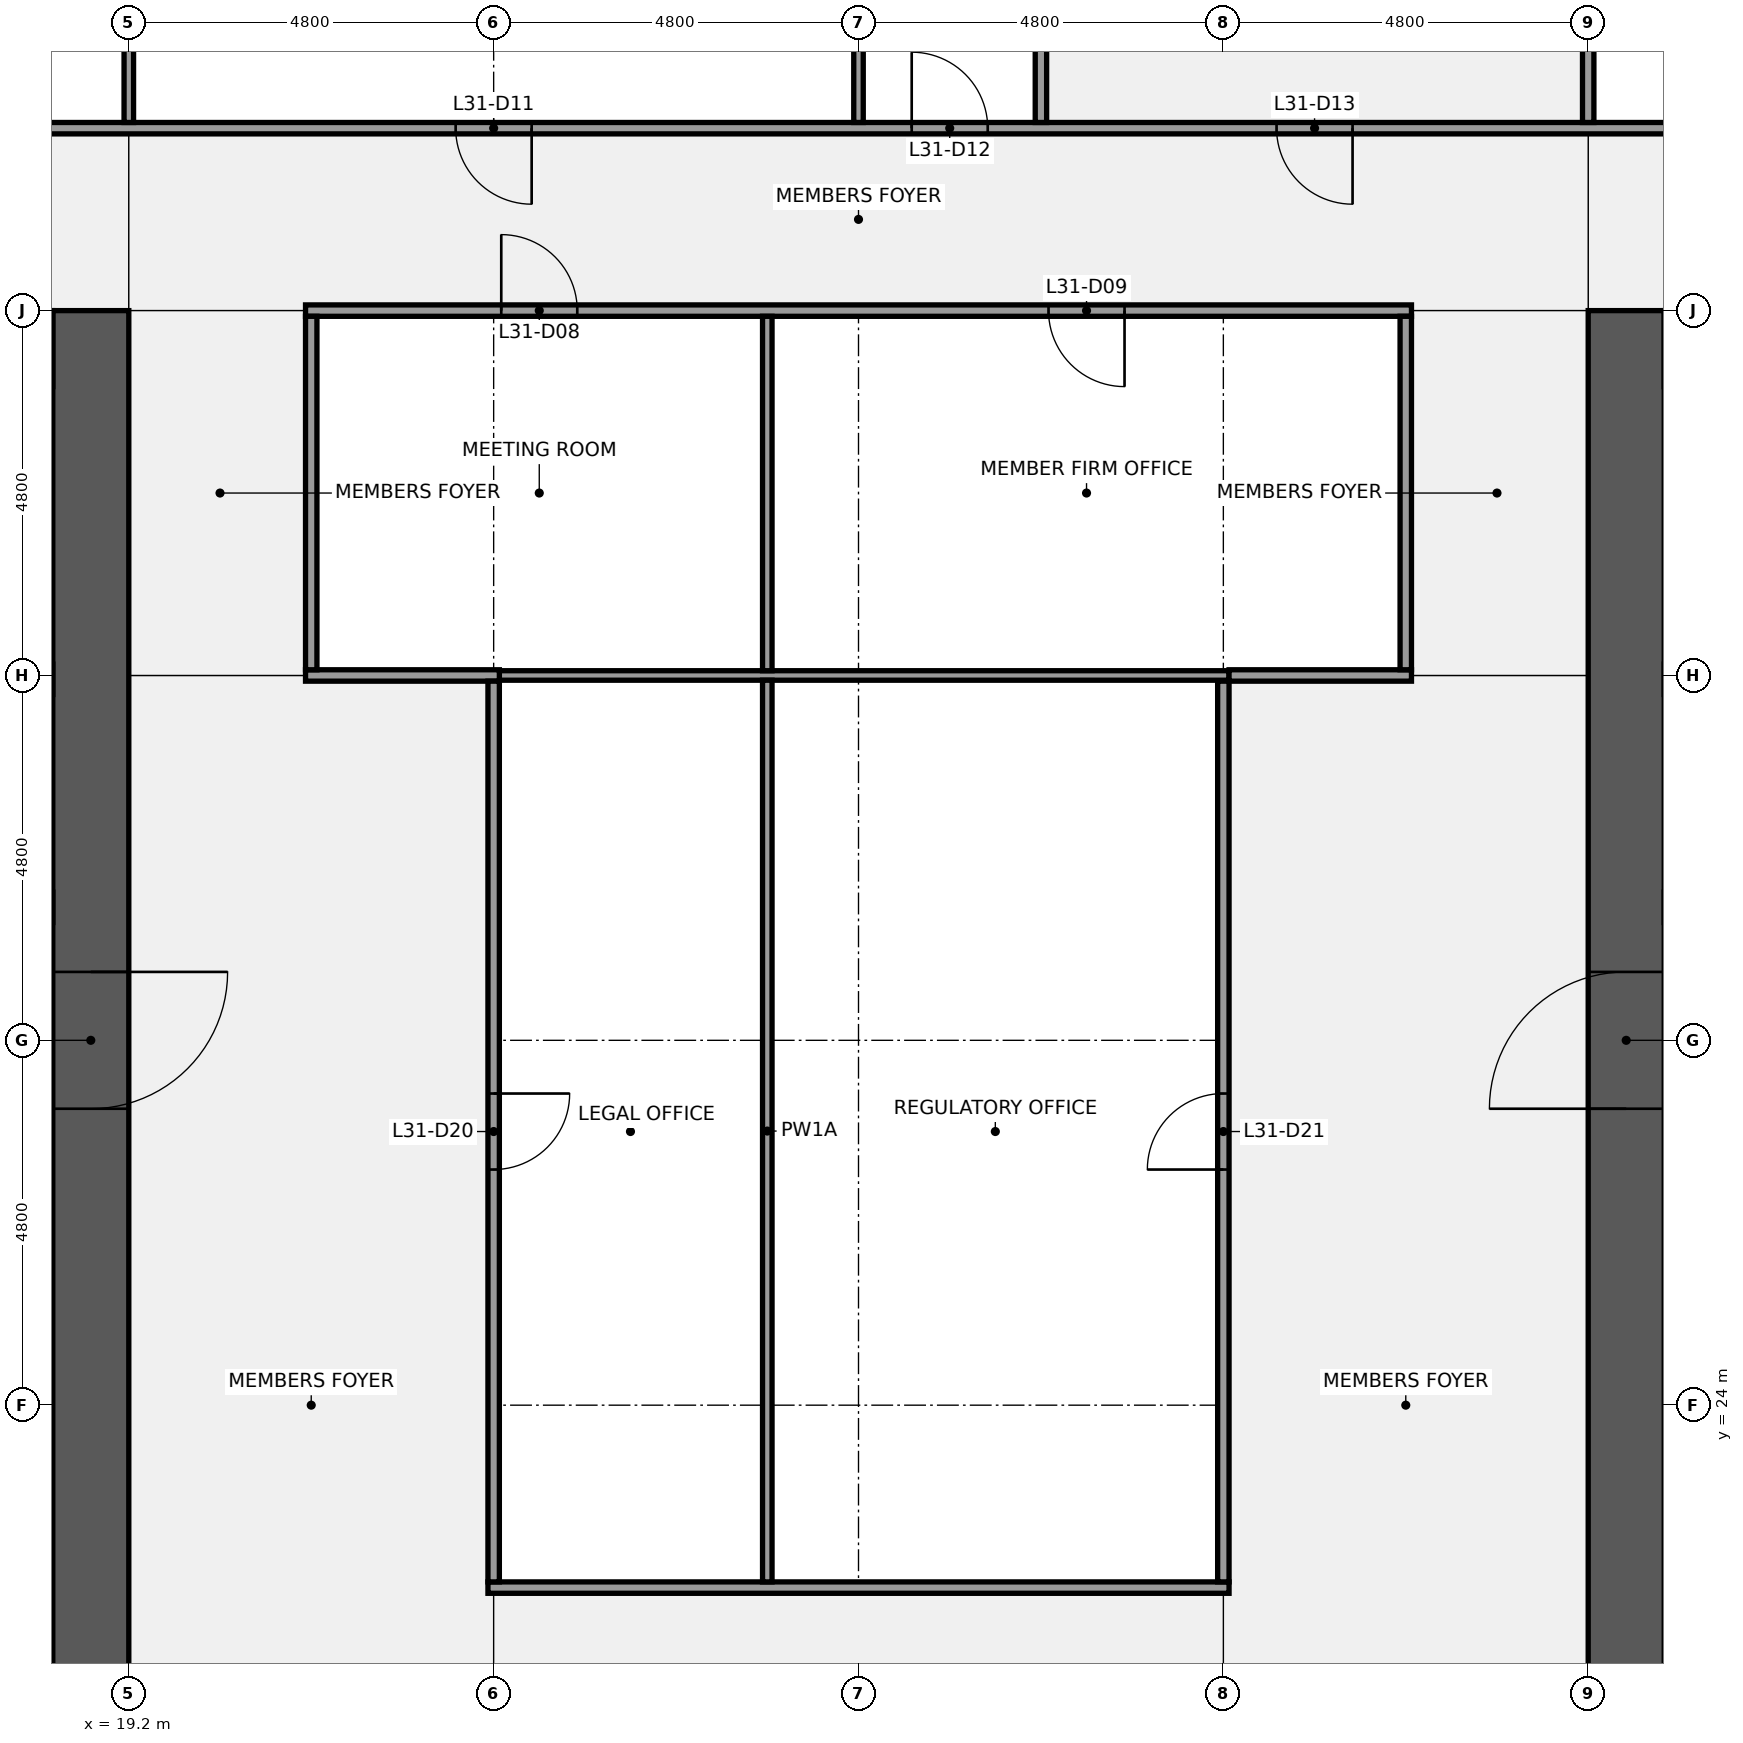
"""IFC4 building model, lengths in metres.
Left out: names, types, materials, properties, quantities, classifications, styles, units other than length and angle.
Written with IfcOpenShell. Run it as: python <this file> out.ifc"""

import sys

from ifc_helpers import new_model, si_unit, direction, frame, frame_2d, origin, place, context, subcontext, project, spatial, rectangle, extrude, element, fill, save


model = new_model("IFC4")
c1 = context("Model", 3, precision=1e-05, world=origin(), true_north=direction((0.0, 1.0)))
c2 = subcontext(c1, "Body", "Model", "MODEL_VIEW")
j1 = project(units=[si_unit("LENGTHUNIT", "METRE"), si_unit("PLANEANGLEUNIT", "RADIAN")], contexts=[c1])
p1 = place(None, origin())
s1 = spatial("IfcSite", under=j1, at=p1, CompositionType="ELEMENT")
p2 = place(p1, origin())
s2 = spatial("IfcBuilding", under=s1, at=p2, CompositionType="ELEMENT")
p3 = place(p2, frame((0.0, 0.0, 144.1)))
s3 = spatial("IfcBuildingStorey", under=s2, at=p3, CompositionType="ELEMENT", Elevation=144.1)
p4 = place(p3, frame((18.7, 38.4, 0.0), z_axis=(0.0, 0.0, 1.0), x_axis=(0.0, -1.0, 0.0)))
e1 = element("IfcWall", 1, at=p4, inside=s3, PredefinedType="SHEAR", context=c2, shape_type="SweptSolid", body=[
    extrude(rectangle(XDim=28.8, YDim=1.0, at=frame_2d((14.4, 0.0))), origin(), (0.0, 0.0, 1.0), 3.84),
])
p5 = place(p4, frame((18.3, 0.0, 0.0)))
e2 = element("IfcOpeningElement", 2, at=p5, cuts=e1, PredefinedType="OPENING", context=c2, shape_type="SweptSolid", body=[
    extrude(rectangle(XDim=1.8, YDim=2.1, at=frame_2d((0.9, 1.05))), frame((0.0, 0.51, 0.0), z_axis=(0.0, -1.0, 0.0), x_axis=(1.0, 0.0, 0.0)), (0.0, 0.0, 1.0), 1.02),
])
p6 = place(p4, frame((8.7, 0.0, 0.0)))
e3 = element("IfcOpeningElement", 3, at=p6, cuts=e1, PredefinedType="OPENING", context=c2, shape_type="SweptSolid", body=[
    extrude(rectangle(XDim=1.8, YDim=2.1, at=frame_2d((0.9, 1.05))), frame((0.0, 0.51, 0.0), z_axis=(0.0, -1.0, 0.0), x_axis=(1.0, 0.0, 0.0)), (0.0, 0.0, 1.0), 1.02),
])
p7 = place(p3, frame((1.0, 30.55, 0.0), z_axis=(0.0, 0.0, 1.0), x_axis=(1.0, 0.0, 0.0)))
e4 = element("IfcWall", 4, at=p7, inside=s3, PredefinedType="SHEAR", context=c2, shape_type="SweptSolid", body=[
    extrude(rectangle(XDim=17.2, YDim=0.4, at=frame_2d((8.6, 0.0))), origin(), (0.0, 0.0, 1.0), 3.84),
])
p8 = place(p7, frame((1.663, 0.0, 0.0)))
e5 = element("IfcOpeningElement", 5, at=p8, cuts=e4, PredefinedType="OPENING", context=c2, shape_type="SweptSolid", body=[
    extrude(rectangle(XDim=1.0, YDim=2.1, at=frame_2d((0.5, 1.05))), frame((0.0, 0.21, 0.0), z_axis=(0.0, -1.0, 0.0), x_axis=(1.0, 0.0, 0.0)), (0.0, 0.0, 1.0), 0.42),
])
p9 = place(p7, frame((5.1, 0.0, 0.0)))
e6 = element("IfcOpeningElement", 6, at=p9, cuts=e4, PredefinedType="OPENING", context=c2, shape_type="SweptSolid", body=[
    extrude(rectangle(XDim=1.0, YDim=2.1, at=frame_2d((0.5, 1.05))), frame((0.0, 0.21, 0.0), z_axis=(0.0, -1.0, 0.0), x_axis=(1.0, 0.0, 0.0)), (0.0, 0.0, 1.0), 0.42),
])
p10 = place(p7, frame((9.3, 0.0, 0.0)))
e7 = element("IfcOpeningElement", 7, at=p10, cuts=e4, PredefinedType="OPENING", context=c2, shape_type="SweptSolid", body=[
    extrude(rectangle(XDim=1.0, YDim=2.1, at=frame_2d((0.5, 1.05))), frame((0.0, 0.21, 0.0), z_axis=(0.0, -1.0, 0.0), x_axis=(1.0, 0.0, 0.0)), (0.0, 0.0, 1.0), 0.42),
])
p11 = place(p7, frame((14.538, 0.0, 0.0)))
e8 = element("IfcOpeningElement", 8, at=p11, cuts=e4, PredefinedType="OPENING", context=c2, shape_type="SweptSolid", body=[
    extrude(rectangle(XDim=1.0, YDim=2.1, at=frame_2d((0.5, 1.05))), frame((0.0, 0.21, 0.0), z_axis=(0.0, -1.0, 0.0), x_axis=(1.0, 0.0, 0.0)), (0.0, 0.0, 1.0), 0.42),
])
p12 = place(p3, frame((1.0, 33.55, 0.0), z_axis=(0.0, 0.0, 1.0), x_axis=(1.0, 0.0, 0.0)))
e9 = element("IfcWall", 9, at=p12, inside=s3, PredefinedType="SHEAR", context=c2, shape_type="SweptSolid", body=[
    extrude(rectangle(XDim=17.2, YDim=0.4, at=frame_2d((8.6, 0.0))), origin(), (0.0, 0.0, 1.0), 3.84),
])
p13 = place(p3, frame((38.9, 9.6, 0.0), z_axis=(0.0, 0.0, 1.0), x_axis=(0.0, 1.0, 0.0)))
e10 = element("IfcWall", 10, at=p13, inside=s3, PredefinedType="SHEAR", context=c2, shape_type="SweptSolid", body=[
    extrude(rectangle(XDim=28.8, YDim=1.0, at=frame_2d((14.4, 0.0))), origin(), (0.0, 0.0, 1.0), 3.84),
])
p14 = place(p13, frame((8.7, 0.0, 0.0)))
e11 = element("IfcOpeningElement", 11, at=p14, cuts=e10, PredefinedType="OPENING", context=c2, shape_type="SweptSolid", body=[
    extrude(rectangle(XDim=1.8, YDim=2.1, at=frame_2d((0.9, 1.05))), frame((0.0, 0.51, 0.0), z_axis=(0.0, -1.0, 0.0), x_axis=(1.0, 0.0, 0.0)), (0.0, 0.0, 1.0), 1.02),
])
p15 = place(p13, frame((18.3, 0.0, 0.0)))
e12 = element("IfcOpeningElement", 12, at=p15, cuts=e10, PredefinedType="OPENING", context=c2, shape_type="SweptSolid", body=[
    extrude(rectangle(XDim=1.8, YDim=2.1, at=frame_2d((0.9, 1.05))), frame((0.0, 0.51, 0.0), z_axis=(0.0, -1.0, 0.0), x_axis=(1.0, 0.0, 0.0)), (0.0, 0.0, 1.0), 1.02),
])
p16 = place(p3, frame((23.925, 21.6, 0.0), z_axis=(0.0, 0.0, 1.0), x_axis=(1.0, 0.0, 0.0)))
e13 = element("IfcWall", 13, at=p16, inside=s3, PredefinedType="PARTITIONING", context=c2, shape_type="SweptSolid", body=[
    extrude(rectangle(XDim=9.75, YDim=0.15, at=frame_2d((4.875, 0.0))), origin(), (0.0, 0.0, 1.0), 2.936),
])
p17 = place(p3, frame((24.075, 33.6, 0.0), z_axis=(0.0, 0.0, 1.0), x_axis=(1.0, 0.0, 0.0)))
e14 = element("IfcWall", 14, at=p17, inside=s3, PredefinedType="PARTITIONING", context=c2, shape_type="SweptSolid", body=[
    extrude(rectangle(XDim=9.6, YDim=0.125, at=frame_2d((4.8, 0.0))), origin(), (0.0, 0.0, 1.0), 2.936),
])
p18 = place(p3, frame((21.525, 33.6, 0.0), z_axis=(0.0, 0.0, 1.0), x_axis=(1.0, 0.0, 0.0)))
e15 = element("IfcWall", 15, at=p18, inside=s3, PredefinedType="PARTITIONING", context=c2, shape_type="SweptSolid", body=[
    extrude(rectangle(XDim=2.55, YDim=0.15, at=frame_2d((1.275, 0.0))), origin(), (0.0, 0.0, 1.0), 2.936),
])
p19 = place(p3, frame((33.675, 33.6, 0.0), z_axis=(0.0, 0.0, 1.0), x_axis=(1.0, 0.0, 0.0)))
e16 = element("IfcWall", 16, at=p19, inside=s3, PredefinedType="PARTITIONING", context=c2, shape_type="SweptSolid", body=[
    extrude(rectangle(XDim=2.4, YDim=0.15, at=frame_2d((1.2, 0.0))), origin(), (0.0, 0.0, 1.0), 2.936),
])
p20 = place(p3, frame((21.525, 38.4, 0.0), z_axis=(0.0, 0.0, 1.0), x_axis=(1.0, 0.0, 0.0)))
e17 = element("IfcWall", 17, at=p20, inside=s3, PredefinedType="PARTITIONING", context=c2, shape_type="SweptSolid", body=[
    extrude(rectangle(XDim=14.55, YDim=0.15, at=frame_2d((7.275, 0.0))), origin(), (0.0, 0.0, 1.0), 2.936),
])
p21 = place(p20, frame((2.575, 0.0, 0.0)))
e18 = element("IfcOpeningElement", 18, at=p21, cuts=e17, PredefinedType="OPENING", context=c2, shape_type="SweptSolid", body=[
    extrude(rectangle(XDim=1.0, YDim=2.1, at=frame_2d((0.5, 1.05))), frame((0.0, 0.085, 0.0), z_axis=(0.0, -1.0, 0.0), x_axis=(1.0, 0.0, 0.0)), (0.0, 0.0, 1.0), 0.17),
])
p22 = place(p20, frame((9.775, 0.0, 0.0)))
e19 = element("IfcOpeningElement", 19, at=p22, cuts=e17, PredefinedType="OPENING", context=c2, shape_type="SweptSolid", body=[
    extrude(rectangle(XDim=1.0, YDim=2.1, at=frame_2d((0.5, 1.05))), frame((0.0, 0.085, 0.0), z_axis=(0.0, -1.0, 0.0), x_axis=(1.0, 0.0, 0.0)), (0.0, 0.0, 1.0), 0.17),
])
p23 = place(p3, frame((14.325, 40.8, 0.0), z_axis=(0.0, 0.0, 1.0), x_axis=(1.0, 0.0, 0.0)))
e20 = element("IfcWall", 20, at=p23, inside=s3, PredefinedType="PARTITIONING", context=c2, shape_type="SweptSolid", body=[
    extrude(rectangle(XDim=28.95, YDim=0.15, at=frame_2d((14.475, 0.0))), origin(), (0.0, 0.0, 1.0), 2.936),
])
p24 = place(p23, frame((1.975, 0.0, 0.0)))
e21 = element("IfcOpeningElement", 21, at=p24, cuts=e20, PredefinedType="OPENING", context=c2, shape_type="SweptSolid", body=[
    extrude(rectangle(XDim=1.0, YDim=2.1, at=frame_2d((0.5, 1.05))), frame((0.0, 0.085, 0.0), z_axis=(0.0, -1.0, 0.0), x_axis=(1.0, 0.0, 0.0)), (0.0, 0.0, 1.0), 0.17),
])
p25 = place(p23, frame((9.175, 0.0, 0.0)))
e22 = element("IfcOpeningElement", 22, at=p25, cuts=e20, PredefinedType="OPENING", context=c2, shape_type="SweptSolid", body=[
    extrude(rectangle(XDim=1.0, YDim=2.1, at=frame_2d((0.5, 1.05))), frame((0.0, 0.085, 0.0), z_axis=(0.0, -1.0, 0.0), x_axis=(1.0, 0.0, 0.0)), (0.0, 0.0, 1.0), 0.17),
])
p26 = place(p23, frame((15.175, 0.0, 0.0)))
e23 = element("IfcOpeningElement", 23, at=p26, cuts=e20, PredefinedType="OPENING", context=c2, shape_type="SweptSolid", body=[
    extrude(rectangle(XDim=1.0, YDim=2.1, at=frame_2d((0.5, 1.05))), frame((0.0, 0.085, 0.0), z_axis=(0.0, -1.0, 0.0), x_axis=(1.0, 0.0, 0.0)), (0.0, 0.0, 1.0), 0.17),
])
p27 = place(p23, frame((19.975, 0.0, 0.0)))
e24 = element("IfcOpeningElement", 24, at=p27, cuts=e20, PredefinedType="OPENING", context=c2, shape_type="SweptSolid", body=[
    extrude(rectangle(XDim=1.0, YDim=2.1, at=frame_2d((0.5, 1.05))), frame((0.0, 0.085, 0.0), z_axis=(0.0, -1.0, 0.0), x_axis=(1.0, 0.0, 0.0)), (0.0, 0.0, 1.0), 0.17),
])
p28 = place(p23, frame((25.975, 0.0, 0.0)))
e25 = element("IfcOpeningElement", 25, at=p28, cuts=e20, PredefinedType="OPENING", context=c2, shape_type="SweptSolid", body=[
    extrude(rectangle(XDim=1.0, YDim=2.1, at=frame_2d((0.5, 1.05))), frame((0.0, 0.085, 0.0), z_axis=(0.0, -1.0, 0.0), x_axis=(1.0, 0.0, 0.0)), (0.0, 0.0, 1.0), 0.17),
])
p29 = place(p3, frame((19.2, 40.875, 0.0), z_axis=(0.0, 0.0, 1.0), x_axis=(0.0, 1.0, 0.0)))
e26 = element("IfcWall", 26, at=p29, inside=s3, PredefinedType="PARTITIONING", context=c2, shape_type="SweptSolid", body=[
    extrude(rectangle(XDim=6.525, YDim=0.125, at=frame_2d((3.262, 0.0))), origin(), (0.0, 0.0, 1.0), 2.936),
])
p30 = place(p3, frame((21.6, 33.675, 0.0), z_axis=(0.0, 0.0, 1.0), x_axis=(0.0, 1.0, 0.0)))
e27 = element("IfcWall", 27, at=p30, inside=s3, PredefinedType="PARTITIONING", context=c2, shape_type="SweptSolid", body=[
    extrude(rectangle(XDim=4.65, YDim=0.15, at=frame_2d((2.325, 0.0))), origin(), (0.0, 0.0, 1.0), 2.936),
])
p31 = place(p3, frame((24.0, 21.675, 0.0), z_axis=(0.0, 0.0, 1.0), x_axis=(0.0, 1.0, 0.0)))
e28 = element("IfcWall", 28, at=p31, inside=s3, PredefinedType="PARTITIONING", context=c2, shape_type="SweptSolid", body=[
    extrude(rectangle(XDim=11.85, YDim=0.15, at=frame_2d((5.925, 0.0))), origin(), (0.0, 0.0, 1.0), 2.936),
])
p32 = place(p31, frame((5.425, 0.0, 0.0)))
e29 = element("IfcOpeningElement", 29, at=p32, cuts=e28, PredefinedType="OPENING", context=c2, shape_type="SweptSolid", body=[
    extrude(rectangle(XDim=1.0, YDim=2.1, at=frame_2d((0.5, 1.05))), frame((0.0, 0.085, 0.0), z_axis=(0.0, -1.0, 0.0), x_axis=(1.0, 0.0, 0.0)), (0.0, 0.0, 1.0), 0.17),
])
p33 = place(p3, frame((27.6, 21.675, 0.0), z_axis=(0.0, 0.0, 1.0), x_axis=(0.0, 1.0, 0.0)))
e30 = element("IfcWall", 30, at=p33, inside=s3, PredefinedType="PARTITIONING", context=c2, shape_type="SweptSolid", body=[
    extrude(rectangle(XDim=11.863, YDim=0.125, at=frame_2d((5.931, 0.0))), origin(), (0.0, 0.0, 1.0), 2.936),
])
p34 = place(p3, frame((27.6, 33.663, 0.0), z_axis=(0.0, 0.0, 1.0), x_axis=(0.0, 1.0, 0.0)))
e31 = element("IfcWall", 31, at=p34, inside=s3, PredefinedType="PARTITIONING", context=c2, shape_type="SweptSolid", body=[
    extrude(rectangle(XDim=4.662, YDim=0.125, at=frame_2d((2.331, 0.0))), origin(), (0.0, 0.0, 1.0), 2.936),
])
p35 = place(p3, frame((28.8, 40.875, 0.0), z_axis=(0.0, 0.0, 1.0), x_axis=(0.0, 1.0, 0.0)))
e32 = element("IfcWall", 32, at=p35, inside=s3, PredefinedType="PARTITIONING", context=c2, shape_type="SweptSolid", body=[
    extrude(rectangle(XDim=6.525, YDim=0.125, at=frame_2d((3.262, 0.0))), origin(), (0.0, 0.0, 1.0), 2.936),
])
p36 = place(p3, frame((31.2, 40.875, 0.0), z_axis=(0.0, 0.0, 1.0), x_axis=(0.0, 1.0, 0.0)))
e33 = element("IfcWall", 33, at=p36, inside=s3, PredefinedType="PARTITIONING", context=c2, shape_type="SweptSolid", body=[
    extrude(rectangle(XDim=3.45, YDim=0.15, at=frame_2d((1.725, 0.0))), origin(), (0.0, 0.0, 1.0), 2.936),
])
p37 = place(p3, frame((33.6, 21.675, 0.0), z_axis=(0.0, 0.0, 1.0), x_axis=(0.0, 1.0, 0.0)))
e34 = element("IfcWall", 34, at=p37, inside=s3, PredefinedType="PARTITIONING", context=c2, shape_type="SweptSolid", body=[
    extrude(rectangle(XDim=11.85, YDim=0.15, at=frame_2d((5.925, 0.0))), origin(), (0.0, 0.0, 1.0), 2.936),
])
p38 = place(p37, frame((5.425, 0.0, 0.0)))
e35 = element("IfcOpeningElement", 35, at=p38, cuts=e34, PredefinedType="OPENING", context=c2, shape_type="SweptSolid", body=[
    extrude(rectangle(XDim=1.0, YDim=2.1, at=frame_2d((0.5, 1.05))), frame((0.0, 0.085, 0.0), z_axis=(0.0, -1.0, 0.0), x_axis=(1.0, 0.0, 0.0)), (0.0, 0.0, 1.0), 0.17),
])
p39 = place(p3, frame((36.0, 33.675, 0.0), z_axis=(0.0, 0.0, 1.0), x_axis=(0.0, 1.0, 0.0)))
e36 = element("IfcWall", 36, at=p39, inside=s3, PredefinedType="PARTITIONING", context=c2, shape_type="SweptSolid", body=[
    extrude(rectangle(XDim=4.65, YDim=0.15, at=frame_2d((2.325, 0.0))), origin(), (0.0, 0.0, 1.0), 2.936),
])
p40 = place(p3, frame((38.4, 40.875, 0.0), z_axis=(0.0, 0.0, 1.0), x_axis=(0.0, 1.0, 0.0)))
e37 = element("IfcWall", 37, at=p40, inside=s3, PredefinedType="PARTITIONING", context=c2, shape_type="SweptSolid", body=[
    extrude(rectangle(XDim=3.45, YDim=0.15, at=frame_2d((1.725, 0.0))), origin(), (0.0, 0.0, 1.0), 2.936),
])
p41 = place(p6, origin())
e38 = element("IfcDoor", 38, at=p41, inside=s3, OperationType="DOUBLE_DOOR_SINGLE_SWING", PredefinedType="DOOR", context=c2, shape_type="SweptSolid", body=[
    extrude(rectangle(XDim=1.8, YDim=2.1, at=frame_2d((0.9, 1.05))), frame((0.0, 0.025, 0.0), z_axis=(0.0, -1.0, 0.0), x_axis=(1.0, 0.0, 0.0)), (0.0, 0.0, 1.0), 0.05),
])
fill(e3, e38)
p42 = place(p15, origin())
e39 = element("IfcDoor", 39, at=p42, inside=s3, OperationType="DOUBLE_DOOR_SINGLE_SWING", PredefinedType="DOOR", context=c2, shape_type="SweptSolid", body=[
    extrude(rectangle(XDim=1.8, YDim=2.1, at=frame_2d((0.9, 1.05))), frame((0.0, 0.025, 0.0), z_axis=(0.0, -1.0, 0.0), x_axis=(1.0, 0.0, 0.0)), (0.0, 0.0, 1.0), 0.05),
])
fill(e12, e39)
p43 = place(p21, origin())
e40 = element("IfcDoor", 40, at=p43, inside=s3, OperationType="SINGLE_SWING_LEFT", PredefinedType="DOOR", context=c2, shape_type="SweptSolid", body=[
    extrude(rectangle(XDim=1.0, YDim=2.1, at=frame_2d((0.5, 1.05))), frame((0.0, 0.025, 0.0), z_axis=(0.0, -1.0, 0.0), x_axis=(1.0, 0.0, 0.0)), (0.0, 0.0, 1.0), 0.05),
])
fill(e18, e40)
p44 = place(p22, origin())
e41 = element("IfcDoor", 41, at=p44, inside=s3, OperationType="SINGLE_SWING_RIGHT", PredefinedType="DOOR", context=c2, shape_type="SweptSolid", body=[
    extrude(rectangle(XDim=1.0, YDim=2.1, at=frame_2d((0.5, 1.05))), frame((0.0, 0.025, 0.0), z_axis=(0.0, -1.0, 0.0), x_axis=(1.0, 0.0, 0.0)), (0.0, 0.0, 1.0), 0.05),
])
fill(e19, e41)
p45 = place(p25, origin())
e42 = element("IfcDoor", 42, at=p45, inside=s3, OperationType="SINGLE_SWING_RIGHT", PredefinedType="DOOR", context=c2, shape_type="SweptSolid", body=[
    extrude(rectangle(XDim=1.0, YDim=2.1, at=frame_2d((0.5, 1.05))), frame((0.0, 0.025, 0.0), z_axis=(0.0, -1.0, 0.0), x_axis=(1.0, 0.0, 0.0)), (0.0, 0.0, 1.0), 0.05),
])
fill(e22, e42)
p46 = place(p26, origin())
e43 = element("IfcDoor", 43, at=p46, inside=s3, OperationType="SINGLE_SWING_LEFT", PredefinedType="DOOR", context=c2, shape_type="SweptSolid", body=[
    extrude(rectangle(XDim=1.0, YDim=2.1, at=frame_2d((0.5, 1.05))), frame((0.0, 0.025, 0.0), z_axis=(0.0, -1.0, 0.0), x_axis=(1.0, 0.0, 0.0)), (0.0, 0.0, 1.0), 0.05),
])
fill(e23, e43)
p47 = place(p27, origin())
e44 = element("IfcDoor", 44, at=p47, inside=s3, OperationType="SINGLE_SWING_RIGHT", PredefinedType="DOOR", context=c2, shape_type="SweptSolid", body=[
    extrude(rectangle(XDim=1.0, YDim=2.1, at=frame_2d((0.5, 1.05))), frame((0.0, 0.025, 0.0), z_axis=(0.0, -1.0, 0.0), x_axis=(1.0, 0.0, 0.0)), (0.0, 0.0, 1.0), 0.05),
])
fill(e24, e44)
p48 = place(p32, origin())
e45 = element("IfcDoor", 45, at=p48, inside=s3, OperationType="SINGLE_SWING_RIGHT", PredefinedType="DOOR", context=c2, shape_type="SweptSolid", body=[
    extrude(rectangle(XDim=1.0, YDim=2.1, at=frame_2d((0.5, 1.05))), frame((0.0, 0.025, 0.0), z_axis=(0.0, -1.0, 0.0), x_axis=(1.0, 0.0, 0.0)), (0.0, 0.0, 1.0), 0.05),
])
fill(e29, e45)
p49 = place(p38, origin())
e46 = element("IfcDoor", 46, at=p49, inside=s3, OperationType="SINGLE_SWING_LEFT", PredefinedType="DOOR", context=c2, shape_type="SweptSolid", body=[
    extrude(rectangle(XDim=1.0, YDim=2.1, at=frame_2d((0.5, 1.05))), frame((0.0, 0.025, 0.0), z_axis=(0.0, -1.0, 0.0), x_axis=(1.0, 0.0, 0.0)), (0.0, 0.0, 1.0), 0.05),
])
fill(e35, e46)
save(model, sys.argv[1])
